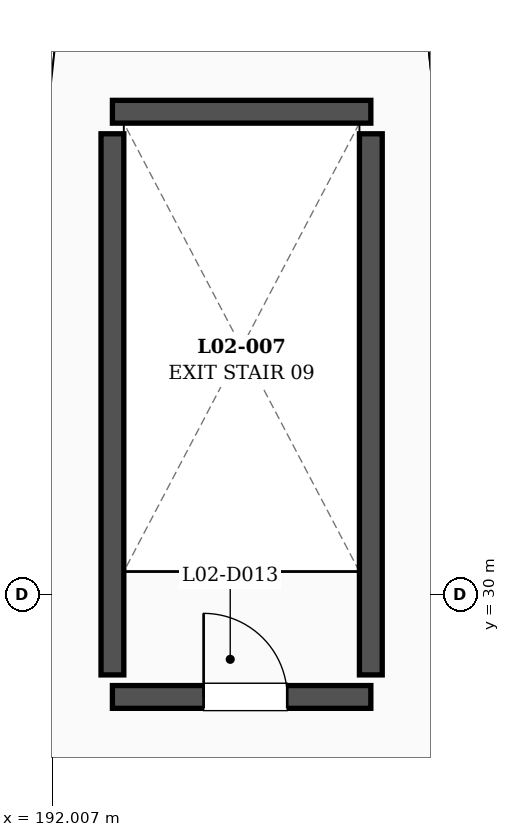
"""IFC4 building model, lengths in metres.
Left out: names, types, materials, properties, quantities, classifications, styles, units other than length and angle.
Written with IfcOpenShell. Run it as: python <this file> out.ifc"""

import sys

from ifc_helpers import new_model, si_unit, direction, frame, frame_2d, origin, place, context, subcontext, project, spatial, rectangle, extrude, element, fill, save


model = new_model("IFC4")
c1 = context("Model", 3, precision=1e-05, world=origin(), true_north=direction((0.0, 1.0)))
c2 = subcontext(c1, "Body", "Model", "MODEL_VIEW")
j1 = project(units=[si_unit("LENGTHUNIT", "METRE"), si_unit("PLANEANGLEUNIT", "RADIAN")], contexts=[c1])
p1 = place(None, origin())
s1 = spatial("IfcSite", under=j1, at=p1, CompositionType="ELEMENT")
p2 = place(p1, origin())
s2 = spatial("IfcBuilding", under=s1, at=p2, CompositionType="ELEMENT")
p3 = place(p2, frame((0.0, 0.0, 10.8)))
s3 = spatial("IfcBuildingStorey", under=s2, at=p3, CompositionType="ELEMENT", Elevation=10.8)
p4 = place(p3, frame((192.8, 28.65, 0.0), z_axis=(0.0, 0.0, 1.0), x_axis=(1.0, 0.0, 0.0)))
e1 = element("IfcWall", 1, at=p4, inside=s3, PredefinedType="SHEAR", context=c2, shape_type="SweptSolid", body=[
    extrude(rectangle(XDim=3.4, YDim=0.3, at=frame_2d((1.7, 0.0))), origin(), (0.0, 0.0, 1.0), 3.98),
])
p5 = place(p4, frame((1.2, 0.0, 0.0)))
e2 = element("IfcOpeningElement", 2, at=p5, cuts=e1, PredefinedType="OPENING", context=c2, shape_type="SweptSolid", body=[
    extrude(rectangle(XDim=1.1, YDim=2.2, at=frame_2d((0.55, 1.1))), frame((0.0, 0.16, 0.0), z_axis=(0.0, -1.0, 0.0), x_axis=(1.0, 0.0, 0.0)), (0.0, 0.0, 1.0), 0.32),
])
p6 = place(p3, frame((192.8, 36.35, 0.0), z_axis=(0.0, 0.0, 1.0), x_axis=(1.0, 0.0, 0.0)))
e3 = element("IfcWall", 3, at=p6, inside=s3, PredefinedType="SHEAR", context=c2, shape_type="SweptSolid", body=[
    extrude(rectangle(XDim=3.4, YDim=0.3, at=frame_2d((1.7, 0.0))), origin(), (0.0, 0.0, 1.0), 3.98),
])
for number, where, z_axis, x_axis in (
    (4, (192.8, 28.94, 0.0), (0.0, 0.0, 1.0), (0.0, 1.0, 0.0)),
    (5, (196.2, 28.94, 0.0), (0.0, 0.0, 1.0), (0.0, 1.0, 0.0)),
):
    element("IfcWall", number, at=place(p3, frame(where, z_axis=z_axis, x_axis=x_axis)), inside=s3, PredefinedType="SHEAR", context=c2, shape_type="SweptSolid", body=[
        extrude(rectangle(XDim=7.12, YDim=0.3, at=frame_2d((3.56, 0.0))), origin(), (0.0, 0.0, 1.0), 3.98),
    ])
p7 = place(p5, origin())
e6 = element("IfcDoor", 6, at=p7, inside=s3, OperationType="SINGLE_SWING_LEFT", PredefinedType="DOOR", context=c2, shape_type="SweptSolid", body=[
    extrude(rectangle(XDim=1.1, YDim=2.2, at=frame_2d((0.55, 1.1))), frame((0.0, 0.025, 0.0), z_axis=(0.0, -1.0, 0.0), x_axis=(1.0, 0.0, 0.0)), (0.0, 0.0, 1.0), 0.05),
])
fill(e2, e6)
save(model, sys.argv[1])
